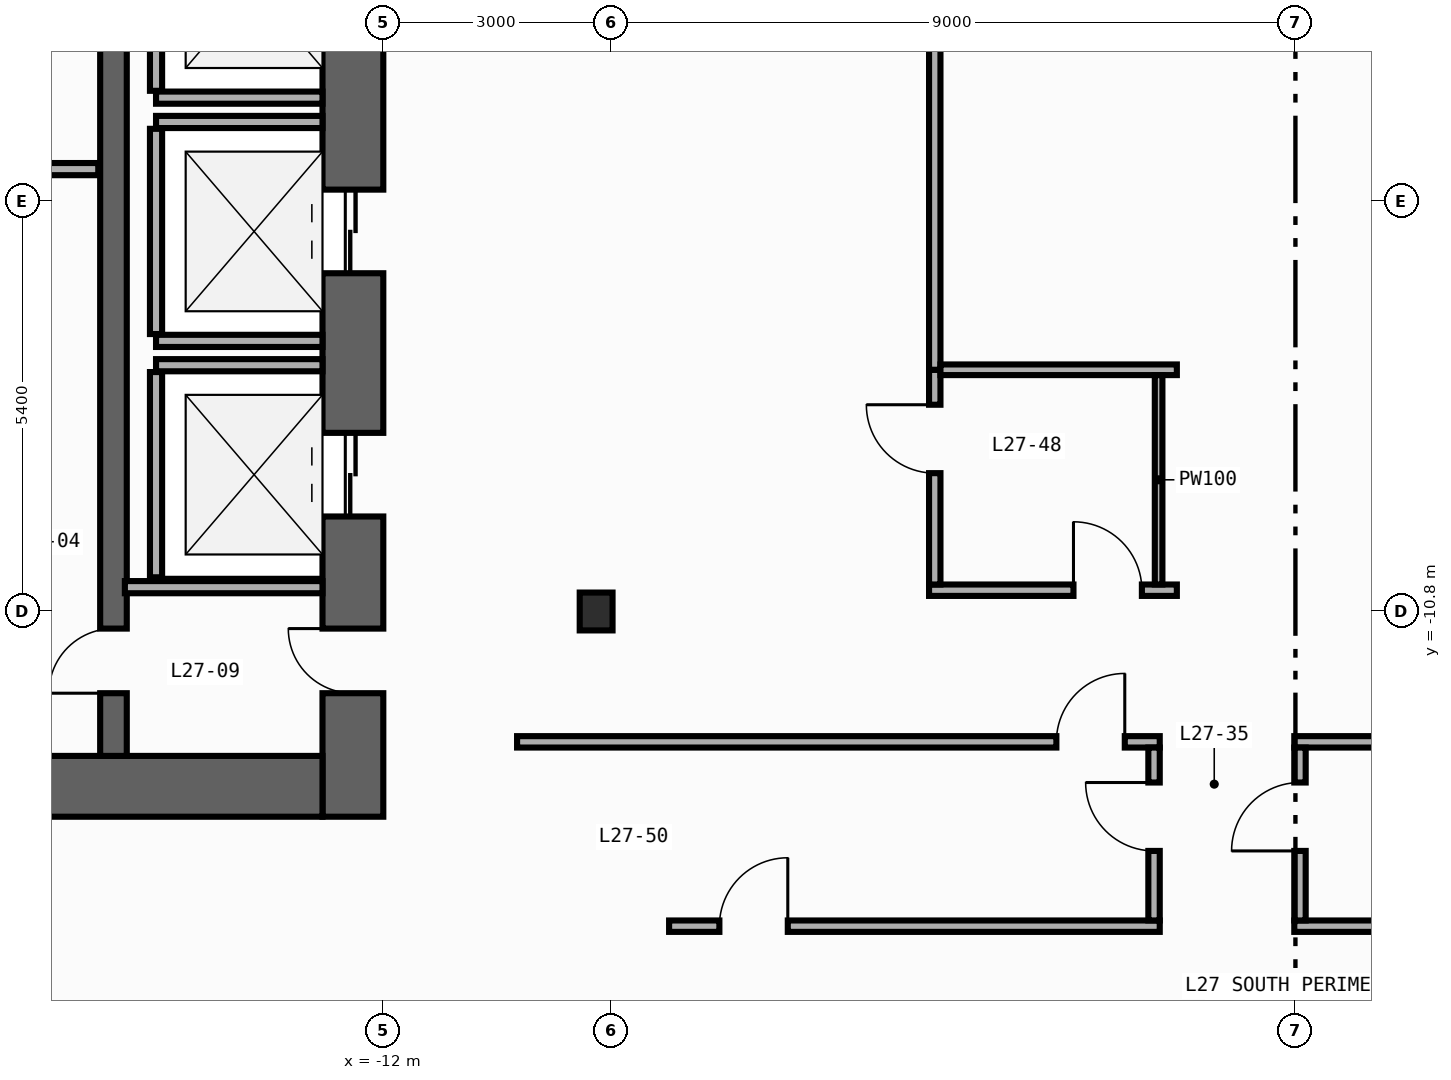
"""IFC4 building model, lengths in metres.
Left out: names, types, materials, properties, quantities, classifications, styles, units other than length and angle.
Written with IfcOpenShell. Run it as: python <this file> out.ifc"""

import sys

from ifc_helpers import new_model, si_unit, direction, frame, frame_2d, origin, origin_2d, place, context, subcontext, project, spatial, rectangle, i_section, extrude, element, fill, save


model = new_model("IFC4")
c1 = context("Model", 3, precision=1e-05, world=origin(), true_north=direction((0.0, 1.0)))
c2 = subcontext(c1, "Body", "Model", "MODEL_VIEW")
j1 = project(units=[si_unit("LENGTHUNIT", "METRE"), si_unit("PLANEANGLEUNIT", "RADIAN")], contexts=[c1])
p1 = place(None, origin())
s1 = spatial("IfcSite", under=j1, at=p1, CompositionType="ELEMENT")
p2 = place(p1, origin())
s2 = spatial("IfcBuilding", under=s1, at=p2, CompositionType="ELEMENT")
p3 = place(p2, frame((0.0, 0.0, 118.4)))
s3 = spatial("IfcBuildingStorey", under=s2, at=p3, CompositionType="ELEMENT", Elevation=118.4)
p4 = place(p3, frame((-12.4, -13.5, 0.0), z_axis=(0.0, 0.0, 1.0), x_axis=(0.0, 1.0, 0.0)))
e1 = element("IfcWall", 1, at=p4, inside=s3, PredefinedType="SHEAR", context=c2, shape_type="SweptSolid", body=[
    extrude(rectangle(XDim=27.0, YDim=0.8, at=frame_2d((13.5, 0.0))), origin(), (0.0, 0.0, 1.0), 3.94),
])
p5 = place(p4, frame((10.35, 0.0, 0.0)))
e2 = element("IfcOpeningElement", 2, at=p5, cuts=e1, PredefinedType="OPENING", context=c2, shape_type="SweptSolid", body=[
    extrude(rectangle(XDim=1.1, YDim=2.2, at=frame_2d((0.55, 1.1))), frame((0.0, 0.41, 0.0), z_axis=(0.0, -1.0, 0.0), x_axis=(1.0, 0.0, 0.0)), (0.0, 0.0, 1.0), 0.82),
])
p6 = place(p4, frame((7.15, 0.0, 0.0)))
e3 = element("IfcOpeningElement", 3, at=p6, cuts=e1, PredefinedType="OPENING", context=c2, shape_type="SweptSolid", body=[
    extrude(rectangle(XDim=1.1, YDim=2.2, at=frame_2d((0.55, 1.1))), frame((0.0, 0.41, 0.0), z_axis=(0.0, -1.0, 0.0), x_axis=(1.0, 0.0, 0.0)), (0.0, 0.0, 1.0), 0.82),
])
p7 = place(p4, frame((3.95, 0.0, 0.0)))
e4 = element("IfcOpeningElement", 4, at=p7, cuts=e1, PredefinedType="OPENING", context=c2, shape_type="SweptSolid", body=[
    extrude(rectangle(XDim=1.1, YDim=2.2, at=frame_2d((0.55, 1.1))), frame((0.0, 0.41, 0.0), z_axis=(0.0, -1.0, 0.0), x_axis=(1.0, 0.0, 0.0)), (0.0, 0.0, 1.0), 0.82),
])
p8 = place(p4, frame((15.175, 0.0, 0.0)))
e5 = element("IfcOpeningElement", 5, at=p8, cuts=e1, PredefinedType="OPENING", context=c2, shape_type="SweptSolid", body=[
    extrude(rectangle(XDim=0.85, YDim=2.1, at=frame_2d((0.425, 1.05))), frame((0.0, 0.41, 0.0), z_axis=(0.0, -1.0, 0.0), x_axis=(1.0, 0.0, 0.0)), (0.0, 0.0, 1.0), 0.82),
])
p9 = place(p4, frame((21.275, 0.0, 0.0)))
e6 = element("IfcOpeningElement", 6, at=p9, cuts=e1, PredefinedType="OPENING", context=c2, shape_type="SweptSolid", body=[
    extrude(rectangle(XDim=0.85, YDim=2.1, at=frame_2d((0.425, 1.05))), frame((0.0, 0.41, 0.0), z_axis=(0.0, -1.0, 0.0), x_axis=(1.0, 0.0, 0.0)), (0.0, 0.0, 1.0), 0.82),
])
p10 = place(p4, frame((12.725, 0.0, 0.0)))
e7 = element("IfcOpeningElement", 7, at=p10, cuts=e1, PredefinedType="OPENING", context=c2, shape_type="SweptSolid", body=[
    extrude(rectangle(XDim=1.15, YDim=2.2, at=frame_2d((0.575, 1.1))), frame((0.0, 0.41, 0.0), z_axis=(0.0, -1.0, 0.0), x_axis=(1.0, 0.0, 0.0)), (0.0, 0.0, 1.0), 0.82),
])
p11 = place(p4, frame((1.625, 0.0, 0.0)))
e8 = element("IfcOpeningElement", 8, at=p11, cuts=e1, PredefinedType="OPENING", context=c2, shape_type="SweptSolid", body=[
    extrude(rectangle(XDim=0.85, YDim=2.1, at=frame_2d((0.425, 1.05))), frame((0.0, 0.41, 0.0), z_axis=(0.0, -1.0, 0.0), x_axis=(1.0, 0.0, 0.0)), (0.0, 0.0, 1.0), 0.82),
])
p12 = place(p3, frame((-19.6, -13.1, 0.0), z_axis=(0.0, 0.0, 1.0), x_axis=(1.0, 0.0, 0.0)))
e9 = element("IfcWall", 9, at=p12, inside=s3, PredefinedType="SHEAR", context=c2, shape_type="SweptSolid", body=[
    extrude(rectangle(XDim=6.8, YDim=0.8, at=frame_2d((3.4, 0.0))), origin(), (0.0, 0.0, 1.0), 3.94),
])
p13 = place(p3, frame((-15.55, -12.7, 0.0), z_axis=(0.0, 0.0, 1.0), x_axis=(0.0, 1.0, 0.0)))
e10 = element("IfcWall", 10, at=p13, inside=s3, PredefinedType="SHEAR", context=c2, shape_type="SweptSolid", body=[
    extrude(rectangle(XDim=25.4, YDim=0.35, at=frame_2d((12.7, 0.0))), origin(), (0.0, 0.0, 1.0), 3.94),
])
p14 = place(p13, frame((11.925, 0.0, 0.0)))
e11 = element("IfcOpeningElement", 11, at=p14, cuts=e10, PredefinedType="OPENING", context=c2, shape_type="SweptSolid", body=[
    extrude(rectangle(XDim=1.15, YDim=2.2, at=frame_2d((0.575, 1.1))), frame((0.0, 0.185, 0.0), z_axis=(0.0, -1.0, 0.0), x_axis=(1.0, 0.0, 0.0)), (0.0, 0.0, 1.0), 0.37),
])
p15 = place(p13, frame((0.825, 0.0, 0.0)))
e12 = element("IfcOpeningElement", 12, at=p15, cuts=e10, PredefinedType="OPENING", context=c2, shape_type="SweptSolid", body=[
    extrude(rectangle(XDim=0.85, YDim=2.1, at=frame_2d((0.425, 1.05))), frame((0.0, 0.185, 0.0), z_axis=(0.0, -1.0, 0.0), x_axis=(1.0, 0.0, 0.0)), (0.0, 0.0, 1.0), 0.37),
])
p16 = place(p3, frame((-9.2, -10.8, 0.0), z_axis=(0.0, 0.0, 1.0), x_axis=(1.0, 0.0, 0.0)))
e13 = element("IfcColumn", 13, at=p16, inside=s3, PredefinedType="COLUMN", context=c2, shape_type="SweptSolid", body=[
    extrude(i_section(OverallWidth=0.432, OverallDepth=0.498, WebThickness=0.045, FlangeThickness=0.07, FilletRadius=0.022, at=origin_2d()), origin(), (0.0, 0.0, 1.0), 4.2),
])
p17 = place(p3, frame((-14.99, -4.04, 0.0), z_axis=(0.0, 0.0, 1.0), x_axis=(1.0, 0.0, 0.0)))
e14 = element("IfcWall", 14, at=p17, inside=s3, PredefinedType="STANDARD", context=c2, shape_type="SweptSolid", body=[
    extrude(rectangle(XDim=2.19, YDim=0.16, at=frame_2d((1.095, 0.0))), origin(), (0.0, 0.0, 1.0), 3.94),
])
p18 = place(p3, frame((-14.99, -3.95, 0.0), z_axis=(0.0, 0.0, 1.0), x_axis=(0.0, 1.0, 0.0)))
e15 = element("IfcWall", 15, at=p18, inside=s3, PredefinedType="STANDARD", context=c2, shape_type="SweptSolid", body=[
    extrude(rectangle(XDim=2.7, YDim=0.16, at=frame_2d((1.35, 0.0))), origin(), (0.0, 0.0, 1.0), 3.94),
])
for number, where, z_axis, x_axis in (
    (16, (-14.99, -7.24, 0.0), (0.0, 0.0, 1.0), (1.0, 0.0, 0.0)),
    (17, (-14.99, -4.36, 0.0), (0.0, 0.0, 1.0), (1.0, 0.0, 0.0)),
):
    element("IfcWall", number, at=place(p3, frame(where, z_axis=z_axis, x_axis=x_axis)), inside=s3, PredefinedType="STANDARD", context=c2, shape_type="SweptSolid", body=[
        extrude(rectangle(XDim=2.19, YDim=0.16, at=frame_2d((1.095, 0.0))), origin(), (0.0, 0.0, 1.0), 3.94),
    ])
p19 = place(p3, frame((-14.99, -7.15, 0.0), z_axis=(0.0, 0.0, 1.0), x_axis=(0.0, 1.0, 0.0)))
e18 = element("IfcWall", 18, at=p19, inside=s3, PredefinedType="STANDARD", context=c2, shape_type="SweptSolid", body=[
    extrude(rectangle(XDim=2.7, YDim=0.16, at=frame_2d((1.35, 0.0))), origin(), (0.0, 0.0, 1.0), 3.94),
])
p20 = place(p3, frame((-14.99, -7.56, 0.0), z_axis=(0.0, 0.0, 1.0), x_axis=(1.0, 0.0, 0.0)))
e19 = element("IfcWall", 19, at=p20, inside=s3, PredefinedType="STANDARD", context=c2, shape_type="SweptSolid", body=[
    extrude(rectangle(XDim=2.19, YDim=0.16, at=frame_2d((1.095, 0.0))), origin(), (0.0, 0.0, 1.0), 3.94),
])
p21 = place(p3, frame((-14.99, -10.35, 0.0), z_axis=(0.0, 0.0, 1.0), x_axis=(0.0, 1.0, 0.0)))
e20 = element("IfcWall", 20, at=p21, inside=s3, PredefinedType="STANDARD", context=c2, shape_type="SweptSolid", body=[
    extrude(rectangle(XDim=2.7, YDim=0.16, at=frame_2d((1.35, 0.0))), origin(), (0.0, 0.0, 1.0), 3.94),
])
p22 = place(p3, frame((-19.55, -4.98, 0.0), z_axis=(0.0, 0.0, 1.0), x_axis=(1.0, 0.0, 0.0)))
e21 = element("IfcWall", 21, at=p22, inside=s3, PredefinedType="STANDARD", context=c2, shape_type="SweptSolid", body=[
    extrude(rectangle(XDim=3.8, YDim=0.16, at=frame_2d((1.9, 0.0))), origin(), (0.0, 0.0, 1.0), 3.94),
])
p23 = place(p3, frame((-15.4, -10.48, 0.0), z_axis=(0.0, 0.0, 1.0), x_axis=(1.0, 0.0, 0.0)))
e22 = element("IfcWall", 22, at=p23, inside=s3, PredefinedType="STANDARD", context=c2, shape_type="SweptSolid", body=[
    extrude(rectangle(XDim=2.6, YDim=0.16, at=frame_2d((1.3, 0.0))), origin(), (0.0, 0.0, 1.0), 3.94),
])
p24 = place(p3, frame((-4.82, -10.52, 0.0), z_axis=(0.0, 0.0, 1.0), x_axis=(1.0, 0.0, 0.0)))
e23 = element("IfcWall", 23, at=p24, inside=s3, PredefinedType="PARTITIONING", context=c2, shape_type="SweptSolid", body=[
    extrude(rectangle(XDim=3.26, YDim=0.15, at=frame_2d((1.63, 0.0))), origin(), (0.0, 0.0, 1.0), 3.24),
])
p25 = place(p24, frame((1.9, 0.0, 0.0)))
e24 = element("IfcOpeningElement", 24, at=p25, cuts=e23, PredefinedType="OPENING", context=c2, shape_type="SweptSolid", body=[
    extrude(rectangle(XDim=0.9, YDim=2.15, at=frame_2d((0.45, 1.075))), frame((0.0, 0.085, 0.0), z_axis=(0.0, -1.0, 0.0), x_axis=(1.0, 0.0, 0.0)), (0.0, 0.0, 1.0), 0.17),
])
p26 = place(p3, frame((-10.24, -12.515, 0.0), z_axis=(0.0, 0.0, 1.0), x_axis=(1.0, 0.0, 0.0)))
e25 = element("IfcWall", 25, at=p26, inside=s3, PredefinedType="PARTITIONING", context=c2, shape_type="SweptSolid", body=[
    extrude(rectangle(XDim=8.455, YDim=0.15, at=frame_2d((4.228, 0.0))), origin(), (0.0, 0.0, 1.0), 3.94),
])
p27 = place(p26, frame((7.095, 0.0, 0.0)))
e26 = element("IfcOpeningElement", 26, at=p27, cuts=e25, PredefinedType="OPENING", context=c2, shape_type="SweptSolid", body=[
    extrude(rectangle(XDim=0.9, YDim=2.15, at=frame_2d((0.45, 1.075))), frame((0.0, 0.085, 0.0), z_axis=(0.0, -1.0, 0.0), x_axis=(1.0, 0.0, 0.0)), (0.0, 0.0, 1.0), 0.17),
])
p28 = place(p3, frame((-0.015, -12.515, 0.0), z_axis=(0.0, 0.0, 1.0), x_axis=(1.0, 0.0, 0.0)))
e27 = element("IfcWall", 27, at=p28, inside=s3, PredefinedType="PARTITIONING", context=c2, shape_type="SweptSolid", body=[
    extrude(rectangle(XDim=10.065, YDim=0.15, at=frame_2d((5.032, 0.0))), origin(), (0.0, 0.0, 1.0), 3.94),
])
p29 = place(p28, frame((1.868, 0.0, 0.0)))
e28 = element("IfcOpeningElement", 28, at=p29, cuts=e27, PredefinedType="OPENING", context=c2, shape_type="SweptSolid", body=[
    extrude(rectangle(XDim=0.9, YDim=2.15, at=frame_2d((0.45, 1.075))), frame((0.0, 0.085, 0.0), z_axis=(0.0, -1.0, 0.0), x_axis=(1.0, 0.0, 0.0)), (0.0, 0.0, 1.0), 0.17),
])
p30 = place(p3, frame((-4.745, -10.445, 0.0), z_axis=(0.0, 0.0, 1.0), x_axis=(0.0, 1.0, 0.0)))
e29 = element("IfcWall", 29, at=p30, inside=s3, PredefinedType="PARTITIONING", context=c2, shape_type="SweptSolid", body=[
    extrude(rectangle(XDim=2.825, YDim=0.15, at=frame_2d((1.413, 0.0))), origin(), (0.0, 0.0, 1.0), 3.49),
])
p31 = place(p30, frame((1.465, 0.0, 0.0)))
e30 = element("IfcOpeningElement", 30, at=p31, cuts=e29, PredefinedType="OPENING", context=c2, shape_type="SweptSolid", body=[
    extrude(rectangle(XDim=0.9, YDim=2.15, at=frame_2d((0.45, 1.075))), frame((0.0, 0.085, 0.0), z_axis=(0.0, -1.0, 0.0), x_axis=(1.0, 0.0, 0.0)), (0.0, 0.0, 1.0), 0.17),
])
p32 = place(p3, frame((-4.745, -7.62, 0.0), z_axis=(0.0, 0.0, 1.0), x_axis=(0.0, 1.0, 0.0)))
e31 = element("IfcWall", 31, at=p32, inside=s3, PredefinedType="PARTITIONING", context=c2, shape_type="SweptSolid", body=[
    extrude(rectangle(XDim=17.065, YDim=0.15, at=frame_2d((8.533, 0.0))), origin(), (0.0, 0.0, 1.0), 3.49),
])
p33 = place(p32, frame((12.496, 0.0, 0.0)))
e32 = element("IfcOpeningElement", 32, at=p33, cuts=e31, PredefinedType="OPENING", context=c2, shape_type="SweptSolid", body=[
    extrude(rectangle(XDim=0.9, YDim=2.15, at=frame_2d((0.45, 1.075))), frame((0.0, 0.085, 0.0), z_axis=(0.0, -1.0, 0.0), x_axis=(1.0, 0.0, 0.0)), (0.0, 0.0, 1.0), 0.17),
])
p34 = place(p3, frame((-8.24, -14.94, 0.0), z_axis=(0.0, 0.0, 1.0), x_axis=(1.0, 0.0, 0.0)))
e33 = element("IfcWall", 33, at=p34, inside=s3, PredefinedType="PARTITIONING", context=c2, shape_type="SweptSolid", body=[
    extrude(rectangle(XDim=6.455, YDim=0.15, at=frame_2d((3.228, 0.0))), origin(), (0.0, 0.0, 1.0), 3.94),
])
p35 = place(p34, frame((0.662, 0.0, 0.0)))
e34 = element("IfcOpeningElement", 34, at=p35, cuts=e33, PredefinedType="OPENING", context=c2, shape_type="SweptSolid", body=[
    extrude(rectangle(XDim=0.9, YDim=2.15, at=frame_2d((0.45, 1.075))), frame((0.0, 0.085, 0.0), z_axis=(0.0, -1.0, 0.0), x_axis=(1.0, 0.0, 0.0)), (0.0, 0.0, 1.0), 0.17),
])
p36 = place(p3, frame((-0.015, -14.94, 0.0), z_axis=(0.0, 0.0, 1.0), x_axis=(1.0, 0.0, 0.0)))
e35 = element("IfcWall", 35, at=p36, inside=s3, PredefinedType="PARTITIONING", context=c2, shape_type="SweptSolid", body=[
    extrude(rectangle(XDim=8.255, YDim=0.15, at=frame_2d((4.127, 0.0))), origin(), (0.0, 0.0, 1.0), 3.94),
])
p37 = place(p36, frame((6.694, 0.0, 0.0)))
e36 = element("IfcOpeningElement", 36, at=p37, cuts=e35, PredefinedType="OPENING", context=c2, shape_type="SweptSolid", body=[
    extrude(rectangle(XDim=0.9, YDim=2.15, at=frame_2d((0.45, 1.075))), frame((0.0, 0.085, 0.0), z_axis=(0.0, -1.0, 0.0), x_axis=(1.0, 0.0, 0.0)), (0.0, 0.0, 1.0), 0.17),
])
p38 = place(p3, frame((-1.86, -14.865, 0.0), z_axis=(0.0, 0.0, 1.0), x_axis=(0.0, 1.0, 0.0)))
e37 = element("IfcWall", 37, at=p38, inside=s3, PredefinedType="PARTITIONING", context=c2, shape_type="SweptSolid", body=[
    extrude(rectangle(XDim=2.275, YDim=0.15, at=frame_2d((1.137, 0.0))), origin(), (0.0, 0.0, 1.0), 3.94),
])
p39 = place(p38, frame((0.915, 0.0, 0.0)))
e38 = element("IfcOpeningElement", 38, at=p39, cuts=e37, PredefinedType="OPENING", context=c2, shape_type="SweptSolid", body=[
    extrude(rectangle(XDim=0.9, YDim=2.15, at=frame_2d((0.45, 1.075))), frame((0.0, 0.085, 0.0), z_axis=(0.0, -1.0, 0.0), x_axis=(1.0, 0.0, 0.0)), (0.0, 0.0, 1.0), 0.17),
])
p40 = place(p3, frame((0.06, -14.865, 0.0), z_axis=(0.0, 0.0, 1.0), x_axis=(0.0, 1.0, 0.0)))
e39 = element("IfcWall", 39, at=p40, inside=s3, PredefinedType="PARTITIONING", context=c2, shape_type="SweptSolid", body=[
    extrude(rectangle(XDim=2.275, YDim=0.15, at=frame_2d((1.137, 0.0))), origin(), (0.0, 0.0, 1.0), 3.94),
])
p41 = place(p40, frame((0.915, 0.0, 0.0)))
e40 = element("IfcOpeningElement", 40, at=p41, cuts=e39, PredefinedType="OPENING", context=c2, shape_type="SweptSolid", body=[
    extrude(rectangle(XDim=0.9, YDim=2.15, at=frame_2d((0.45, 1.075))), frame((0.0, 0.085, 0.0), z_axis=(0.0, -1.0, 0.0), x_axis=(1.0, 0.0, 0.0)), (0.0, 0.0, 1.0), 0.17),
])
p42 = place(p3, frame((-4.67, -7.62, 0.0), z_axis=(0.0, 0.0, 1.0), x_axis=(1.0, 0.0, 0.0)))
e41 = element("IfcWall", 41, at=p42, inside=s3, PredefinedType="PARTITIONING", context=c2, shape_type="SweptSolid", body=[
    extrude(rectangle(XDim=3.11, YDim=0.14, at=frame_2d((1.555, 0.0))), origin(), (0.0, 0.0, 1.0), 3.94),
])
p43 = place(p3, frame((-1.8, -7.69, 0.0), z_axis=(0.0, 0.0, 1.0), x_axis=(0.0, -1.0, 0.0)))
e42 = element("IfcWall", 42, at=p43, inside=s3, PredefinedType="PARTITIONING", context=c2, shape_type="SweptSolid", body=[
    extrude(rectangle(XDim=2.755, YDim=0.1, at=frame_2d((1.377, 0.0))), origin(), (0.0, 0.0, 1.0), 3.94),
])
p44 = place(p6, origin())
e43 = element("IfcDoor", 43, at=p44, inside=s3, OperationType="DOUBLE_DOOR_SLIDING", PredefinedType="DOOR", context=c2, shape_type="SweptSolid", body=[
    extrude(rectangle(XDim=1.1, YDim=2.2, at=frame_2d((0.55, 1.1))), frame((0.0, 0.025, 0.0), z_axis=(0.0, -1.0, 0.0), x_axis=(1.0, 0.0, 0.0)), (0.0, 0.0, 1.0), 0.05),
])
fill(e3, e43)
p45 = place(p7, origin())
e44 = element("IfcDoor", 44, at=p45, inside=s3, OperationType="DOUBLE_DOOR_SLIDING", PredefinedType="DOOR", context=c2, shape_type="SweptSolid", body=[
    extrude(rectangle(XDim=1.1, YDim=2.2, at=frame_2d((0.55, 1.1))), frame((0.0, 0.025, 0.0), z_axis=(0.0, -1.0, 0.0), x_axis=(1.0, 0.0, 0.0)), (0.0, 0.0, 1.0), 0.05),
])
fill(e4, e44)
p46 = place(p11, origin())
e45 = element("IfcDoor", 45, at=p46, inside=s3, OperationType="SINGLE_SWING_RIGHT", PredefinedType="DOOR", context=c2, shape_type="SweptSolid", body=[
    extrude(rectangle(XDim=0.85, YDim=2.1, at=frame_2d((0.425, 1.05))), frame((0.0, 0.025, 0.0), z_axis=(0.0, -1.0, 0.0), x_axis=(1.0, 0.0, 0.0)), (0.0, 0.0, 1.0), 0.05),
])
fill(e8, e45)
p47 = place(p15, origin())
e46 = element("IfcDoor", 46, at=p47, inside=s3, OperationType="SINGLE_SWING_LEFT", PredefinedType="DOOR", context=c2, shape_type="SweptSolid", body=[
    extrude(rectangle(XDim=0.85, YDim=2.1, at=frame_2d((0.425, 1.05))), frame((0.0, 0.025, 0.0), z_axis=(0.0, -1.0, 0.0), x_axis=(1.0, 0.0, 0.0)), (0.0, 0.0, 1.0), 0.05),
])
fill(e12, e46)
p48 = place(p25, origin())
e47 = element("IfcDoor", 47, at=p48, inside=s3, OperationType="SINGLE_SWING_LEFT", PredefinedType="DOOR", context=c2, shape_type="SweptSolid", body=[
    extrude(rectangle(XDim=0.9, YDim=2.15, at=frame_2d((0.45, 1.075))), frame((0.0, 0.025, 0.0), z_axis=(0.0, -1.0, 0.0), x_axis=(1.0, 0.0, 0.0)), (0.0, 0.0, 1.0), 0.05),
])
fill(e24, e47)
p49 = place(p27, origin())
e48 = element("IfcDoor", 48, at=p49, inside=s3, OperationType="SINGLE_SWING_RIGHT", PredefinedType="DOOR", context=c2, shape_type="SweptSolid", body=[
    extrude(rectangle(XDim=0.9, YDim=2.15, at=frame_2d((0.45, 1.075))), frame((0.0, 0.025, 0.0), z_axis=(0.0, -1.0, 0.0), x_axis=(1.0, 0.0, 0.0)), (0.0, 0.0, 1.0), 0.05),
])
fill(e26, e48)
p50 = place(p31, origin())
e49 = element("IfcDoor", 49, at=p50, inside=s3, OperationType="SINGLE_SWING_RIGHT", PredefinedType="DOOR", context=c2, shape_type="SweptSolid", body=[
    extrude(rectangle(XDim=0.9, YDim=2.15, at=frame_2d((0.45, 1.075))), frame((0.0, 0.025, 0.0), z_axis=(0.0, -1.0, 0.0), x_axis=(1.0, 0.0, 0.0)), (0.0, 0.0, 1.0), 0.05),
])
fill(e30, e49)
p51 = place(p35, origin())
e50 = element("IfcDoor", 50, at=p51, inside=s3, OperationType="SINGLE_SWING_RIGHT", PredefinedType="DOOR", context=c2, shape_type="SweptSolid", body=[
    extrude(rectangle(XDim=0.9, YDim=2.15, at=frame_2d((0.45, 1.075))), frame((0.0, 0.025, 0.0), z_axis=(0.0, -1.0, 0.0), x_axis=(1.0, 0.0, 0.0)), (0.0, 0.0, 1.0), 0.05),
])
fill(e34, e50)
p52 = place(p39, origin())
e51 = element("IfcDoor", 51, at=p52, inside=s3, OperationType="SINGLE_SWING_RIGHT", PredefinedType="DOOR", context=c2, shape_type="SweptSolid", body=[
    extrude(rectangle(XDim=0.9, YDim=2.15, at=frame_2d((0.45, 1.075))), frame((0.0, 0.025, 0.0), z_axis=(0.0, -1.0, 0.0), x_axis=(1.0, 0.0, 0.0)), (0.0, 0.0, 1.0), 0.05),
])
fill(e38, e51)
p53 = place(p41, origin())
e52 = element("IfcDoor", 52, at=p53, inside=s3, OperationType="SINGLE_SWING_LEFT", PredefinedType="DOOR", context=c2, shape_type="SweptSolid", body=[
    extrude(rectangle(XDim=0.9, YDim=2.15, at=frame_2d((0.45, 1.075))), frame((0.0, 0.025, 0.0), z_axis=(0.0, -1.0, 0.0), x_axis=(1.0, 0.0, 0.0)), (0.0, 0.0, 1.0), 0.05),
])
fill(e40, e52)
save(model, sys.argv[1])
